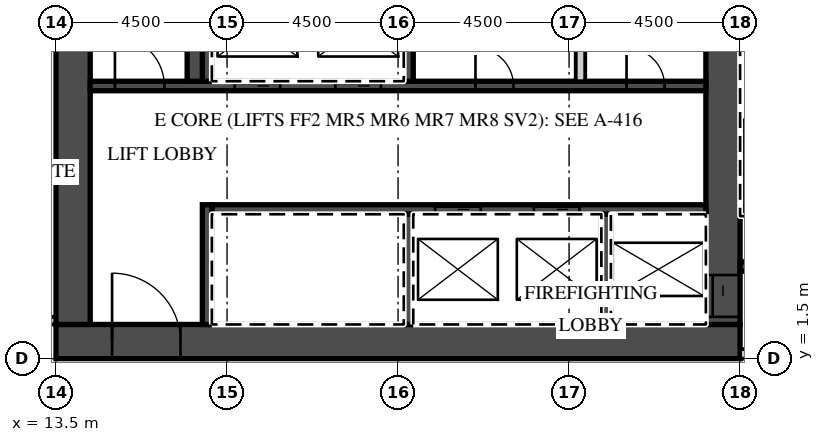
"""IFC4 building model, lengths in metres.
Left out: names, types, materials, properties, quantities, classifications, styles, units other than length and angle.
Written with IfcOpenShell. Run it as: python <this file> out.ifc"""

import sys

from ifc_helpers import new_model, si_unit, direction, frame, frame_2d, origin, place, context, subcontext, project, spatial, rectangle, extrude, element, fill, save


model = new_model("IFC4")
c1 = context("Model", 3, precision=1e-05, world=origin(), true_north=direction((0.0, 1.0)))
c2 = subcontext(c1, "Body", "Model", "MODEL_VIEW")
j1 = project(units=[si_unit("LENGTHUNIT", "METRE"), si_unit("PLANEANGLEUNIT", "RADIAN")], contexts=[c1])
p1 = place(None, origin())
s1 = spatial("IfcSite", under=j1, at=p1, CompositionType="ELEMENT")
p2 = place(p1, origin())
s2 = spatial("IfcBuilding", under=s1, at=p2, CompositionType="ELEMENT")
p3 = place(p2, frame((0.0, 0.0, 203.2)))
s3 = spatial("IfcBuildingStorey", under=s2, at=p3, CompositionType="ELEMENT", Elevation=203.2)
p4 = place(p3, frame((-13.5, 2.5, 0.0), z_axis=(0.0, 0.0, 1.0), x_axis=(1.0, 0.0, 0.0)))
e1 = element("IfcWall", 1, at=p4, inside=s3, PredefinedType="PARTITIONING", context=c2, shape_type="SweptSolid", body=[
    extrude(rectangle(XDim=27.0, YDim=0.2, at=frame_2d((13.5, 0.0))), origin(), (0.0, 0.0, 1.0), 3.0),
])
p5 = place(p4, frame((2.925, 0.0, 0.0)))
e2 = element("IfcOpeningElement", 2, at=p5, cuts=e1, PredefinedType="OPENING", context=c2, shape_type="SweptSolid", body=[
    extrude(rectangle(XDim=1.0, YDim=2.1, at=frame_2d((0.5, 1.05))), frame((0.0, 0.11, 0.0), z_axis=(0.0, -1.0, 0.0), x_axis=(1.0, 0.0, 0.0)), (0.0, 0.0, 1.0), 0.22),
])
p6 = place(p4, frame((9.863, 0.0, 0.0)))
e3 = element("IfcOpeningElement", 3, at=p6, cuts=e1, PredefinedType="OPENING", context=c2, shape_type="SweptSolid", body=[
    extrude(rectangle(XDim=1.2, YDim=2.1, at=frame_2d((0.6, 1.05))), frame((0.0, 0.11, 0.0), z_axis=(0.0, -1.0, 0.0), x_axis=(1.0, 0.0, 0.0)), (0.0, 0.0, 1.0), 0.22),
])
p7 = place(p4, frame((15.938, 0.0, 0.0)))
e4 = element("IfcOpeningElement", 4, at=p7, cuts=e1, PredefinedType="OPENING", context=c2, shape_type="SweptSolid", body=[
    extrude(rectangle(XDim=1.2, YDim=2.1, at=frame_2d((0.6, 1.05))), frame((0.0, 0.11, 0.0), z_axis=(0.0, -1.0, 0.0), x_axis=(1.0, 0.0, 0.0)), (0.0, 0.0, 1.0), 0.22),
])
p8 = place(p4, frame((23.075, 0.0, 0.0)))
e5 = element("IfcOpeningElement", 5, at=p8, cuts=e1, PredefinedType="OPENING", context=c2, shape_type="SweptSolid", body=[
    extrude(rectangle(XDim=1.0, YDim=2.1, at=frame_2d((0.5, 1.05))), frame((0.0, 0.11, 0.0), z_axis=(0.0, -1.0, 0.0), x_axis=(1.0, 0.0, 0.0)), (0.0, 0.0, 1.0), 0.22),
])
p9 = place(p3, frame((13.5, 1.95, 0.0), z_axis=(0.0, 0.0, 1.0), x_axis=(1.0, 0.0, 0.0)))
e6 = element("IfcWall", 6, at=p9, inside=s3, PredefinedType="SHEAR", context=c2, shape_type="SweptSolid", body=[
    extrude(rectangle(XDim=18.0, YDim=0.9, at=frame_2d((9.0, 0.0))), origin(), (0.0, 0.0, 1.0), 3.0),
])
p10 = place(p9, frame((1.475, 0.0, 0.0)))
e7 = element("IfcOpeningElement", 7, at=p10, cuts=e6, PredefinedType="OPENING", context=c2, shape_type="SweptSolid", body=[
    extrude(rectangle(XDim=1.8, YDim=2.1, at=frame_2d((0.9, 1.05))), frame((0.0, 0.46, 0.0), z_axis=(0.0, -1.0, 0.0), x_axis=(1.0, 0.0, 0.0)), (0.0, 0.0, 1.0), 0.92),
])
p11 = place(p3, frame((31.05, 2.4, 0.0), z_axis=(0.0, 0.0, 1.0), x_axis=(0.0, 1.0, 0.0)))
e8 = element("IfcWall", 8, at=p11, inside=s3, PredefinedType="SHEAR", context=c2, shape_type="SweptSolid", body=[
    extrude(rectangle(XDim=12.8, YDim=0.9, at=frame_2d((6.4, 0.0))), origin(), (0.0, 0.0, 1.0), 3.0),
])
p12 = place(p11, frame((0.2, 0.0, 0.0)))
e9 = element("IfcOpeningElement", 9, at=p12, cuts=e8, PredefinedType="OPENING", context=c2, shape_type="SweptSolid", body=[
    extrude(rectangle(XDim=1.1, YDim=2.1, at=frame_2d((0.55, 1.05))), frame((0.0, 0.46, 0.0), z_axis=(0.0, -1.0, 0.0), x_axis=(1.0, 0.0, 0.0)), (0.0, 0.0, 1.0), 0.92),
])
p13 = place(p3, frame((13.95, 2.4, 0.0), z_axis=(0.0, 0.0, 1.0), x_axis=(0.0, 1.0, 0.0)))
e10 = element("IfcWall", 10, at=p13, inside=s3, PredefinedType="SHEAR", context=c2, shape_type="SweptSolid", body=[
    extrude(rectangle(XDim=12.2, YDim=0.9, at=frame_2d((6.1, 0.0))), origin(), (0.0, 0.0, 1.0), 3.0),
])
p14 = place(p3, frame((17.6, 5.425, 0.0), z_axis=(0.0, 0.0, 1.0), x_axis=(1.0, 0.0, 0.0)))
e11 = element("IfcWall", 11, at=p14, inside=s3, PredefinedType="SHEAR", context=c2, shape_type="SweptSolid", body=[
    extrude(rectangle(XDim=13.0, YDim=0.25, at=frame_2d((6.5, 0.0))), origin(), (0.0, 0.0, 1.0), 3.0),
])
p15 = place(p14, frame((8.475, 0.0, 0.0)))
e12 = element("IfcOpeningElement", 12, at=p15, cuts=e11, PredefinedType="OPENING", context=c2, shape_type="SweptSolid", body=[
    extrude(rectangle(XDim=1.2, YDim=2.1, at=frame_2d((0.6, 1.05))), frame((0.0, 0.135, 0.0), z_axis=(0.0, -1.0, 0.0), x_axis=(1.0, 0.0, 0.0)), (0.0, 0.0, 1.0), 0.27),
])
p16 = place(p14, frame((5.875, 0.0, 0.0)))
e13 = element("IfcOpeningElement", 13, at=p16, cuts=e11, PredefinedType="OPENING", context=c2, shape_type="SweptSolid", body=[
    extrude(rectangle(XDim=1.2, YDim=2.1, at=frame_2d((0.6, 1.05))), frame((0.0, 0.135, 0.0), z_axis=(0.0, -1.0, 0.0), x_axis=(1.0, 0.0, 0.0)), (0.0, 0.0, 1.0), 0.27),
])
p17 = place(p3, frame((17.475, 2.4, 0.0), z_axis=(0.0, 0.0, 1.0), x_axis=(0.0, 1.0, 0.0)))
e14 = element("IfcWall", 14, at=p17, inside=s3, PredefinedType="SHEAR", context=c2, shape_type="SweptSolid", body=[
    extrude(rectangle(XDim=3.15, YDim=0.25, at=frame_2d((1.575, 0.0))), origin(), (0.0, 0.0, 1.0), 3.0),
])
for number, where, z_axis, x_axis in (
    (15, (27.975, 2.4, 0.0), (0.0, 0.0, 1.0), (0.0, 1.0, 0.0)),
    (16, (22.775, 2.4, 0.0), (0.0, 0.0, 1.0), (0.0, 1.0, 0.0)),
):
    element("IfcWall", number, at=place(p3, frame(where, z_axis=z_axis, x_axis=x_axis)), inside=s3, PredefinedType="SHEAR", context=c2, shape_type="SweptSolid", body=[
        extrude(rectangle(XDim=2.9, YDim=0.25, at=frame_2d((1.45, 0.0))), origin(), (0.0, 0.0, 1.0), 3.0),
    ])
p18 = place(p3, frame((14.4, 8.675, 0.0), z_axis=(0.0, 0.0, 1.0), x_axis=(1.0, 0.0, 0.0)))
e17 = element("IfcWall", 17, at=p18, inside=s3, PredefinedType="SHEAR", context=c2, shape_type="SweptSolid", body=[
    extrude(rectangle(XDim=16.2, YDim=0.25, at=frame_2d((8.1, 0.0))), origin(), (0.0, 0.0, 1.0), 3.0),
])
p19 = place(p18, frame((6.45, 0.0, 0.0)))
e18 = element("IfcOpeningElement", 18, at=p19, cuts=e17, PredefinedType="OPENING", context=c2, shape_type="SweptSolid", body=[
    extrude(rectangle(XDim=1.2, YDim=2.1, at=frame_2d((0.6, 1.05))), frame((0.0, 0.135, 0.0), z_axis=(0.0, -1.0, 0.0), x_axis=(1.0, 0.0, 0.0)), (0.0, 0.0, 1.0), 0.27),
])
p20 = place(p18, frame((3.8, 0.0, 0.0)))
e19 = element("IfcOpeningElement", 19, at=p20, cuts=e17, PredefinedType="OPENING", context=c2, shape_type="SweptSolid", body=[
    extrude(rectangle(XDim=1.2, YDim=2.1, at=frame_2d((0.6, 1.05))), frame((0.0, 0.135, 0.0), z_axis=(0.0, -1.0, 0.0), x_axis=(1.0, 0.0, 0.0)), (0.0, 0.0, 1.0), 0.27),
])
p21 = place(p18, frame((0.65, 0.0, 0.0)))
e20 = element("IfcOpeningElement", 20, at=p21, cuts=e17, PredefinedType="OPENING", context=c2, shape_type="SweptSolid", body=[
    extrude(rectangle(XDim=1.3, YDim=2.1, at=frame_2d((0.65, 1.05))), frame((0.0, 0.135, 0.0), z_axis=(0.0, -1.0, 0.0), x_axis=(1.0, 0.0, 0.0)), (0.0, 0.0, 1.0), 0.27),
])
p22 = place(p18, frame((14.113, 0.0, 0.0)))
e21 = element("IfcOpeningElement", 21, at=p22, cuts=e17, PredefinedType="OPENING", context=c2, shape_type="SweptSolid", body=[
    extrude(rectangle(XDim=1.0, YDim=2.1, at=frame_2d((0.5, 1.05))), frame((0.0, 0.135, 0.0), z_axis=(0.0, -1.0, 0.0), x_axis=(1.0, 0.0, 0.0)), (0.0, 0.0, 1.0), 0.27),
])
p23 = place(p18, frame((10.137, 0.0, 0.0)))
e22 = element("IfcOpeningElement", 22, at=p23, cuts=e17, PredefinedType="OPENING", context=c2, shape_type="SweptSolid", body=[
    extrude(rectangle(XDim=1.0, YDim=2.1, at=frame_2d((0.5, 1.05))), frame((0.0, 0.135, 0.0), z_axis=(0.0, -1.0, 0.0), x_axis=(1.0, 0.0, 0.0)), (0.0, 0.0, 1.0), 0.27),
])
for number, where, z_axis, x_axis in (
    (23, (17.475, 8.8, 0.0), (0.0, 0.0, 1.0), (0.0, 1.0, 0.0)),
    (24, (22.775, 8.8, 0.0), (0.0, 0.0, 1.0), (0.0, 1.0, 0.0)),
):
    element("IfcWall", number, at=place(p3, frame(where, z_axis=z_axis, x_axis=x_axis)), inside=s3, PredefinedType="SHEAR", context=c2, shape_type="SweptSolid", body=[
        extrude(rectangle(XDim=2.9, YDim=0.25, at=frame_2d((1.45, 0.0))), origin(), (0.0, 0.0, 1.0), 3.0),
    ])
p24 = place(p3, frame((27.3, 8.8, 0.0), z_axis=(0.0, 0.0, 1.0), x_axis=(0.0, 1.0, 0.0)))
e25 = element("IfcWall", 25, at=p24, inside=s3, PredefinedType="PARTITIONING", context=c2, shape_type="SweptSolid", body=[
    extrude(rectangle(XDim=2.9, YDim=0.25, at=frame_2d((1.45, 0.0))), origin(), (0.0, 0.0, 1.0), 3.0),
])
p25 = place(p3, frame((17.15, 8.8, 0.0), z_axis=(0.0, 0.0, 1.0), x_axis=(0.0, 1.0, 0.0)))
e26 = element("IfcWall", 26, at=p25, inside=s3, PredefinedType="SHEAR", context=c2, shape_type="SweptSolid", body=[
    extrude(rectangle(XDim=5.8, YDim=0.4, at=frame_2d((2.9, 0.0))), origin(), (0.0, 0.0, 1.0), 3.0),
])
p26 = place(p3, frame((31.5, 1.625, 0.0), z_axis=(0.0, 0.0, 1.0), x_axis=(1.0, 0.0, 0.0)))
e27 = element("IfcWall", 27, at=p26, inside=s3, PredefinedType="PARTITIONING", context=c2, shape_type="SweptSolid", body=[
    extrude(rectangle(XDim=8.035, YDim=0.25, at=frame_2d((4.018, 0.0))), origin(), (0.0, 0.0, 1.0), 3.0),
])
p27 = place(p26, frame((0.625, 0.0, 0.0)))
e28 = element("IfcOpeningElement", 28, at=p27, cuts=e27, PredefinedType="OPENING", context=c2, shape_type="SweptSolid", body=[
    extrude(rectangle(XDim=1.3, YDim=2.1, at=frame_2d((0.65, 1.05))), frame((0.0, 0.135, 0.0), z_axis=(0.0, -1.0, 0.0), x_axis=(1.0, 0.0, 0.0)), (0.0, 0.0, 1.0), 0.27),
])
p28 = place(p26, frame((3.25, 0.0, 0.0)))
e29 = element("IfcOpeningElement", 29, at=p28, cuts=e27, PredefinedType="OPENING", context=c2, shape_type="SweptSolid", body=[
    extrude(rectangle(XDim=1.1, YDim=2.1, at=frame_2d((0.55, 1.05))), frame((0.0, 0.135, 0.0), z_axis=(0.0, -1.0, 0.0), x_axis=(1.0, 0.0, 0.0)), (0.0, 0.0, 1.0), 0.27),
])
p29 = place(p3, frame((31.5, 3.925, 0.0), z_axis=(0.0, 0.0, 1.0), x_axis=(1.0, 0.0, 0.0)))
e30 = element("IfcWall", 30, at=p29, inside=s3, PredefinedType="SHEAR", context=c2, shape_type="SweptSolid", body=[
    extrude(rectangle(XDim=2.55, YDim=0.25, at=frame_2d((1.275, 0.0))), origin(), (0.0, 0.0, 1.0), 3.0),
])
p30 = place(p29, frame((0.625, 0.0, 0.0)))
e31 = element("IfcOpeningElement", 31, at=p30, cuts=e30, PredefinedType="OPENING", context=c2, shape_type="SweptSolid", body=[
    extrude(rectangle(XDim=1.3, YDim=2.1, at=frame_2d((0.65, 1.05))), frame((0.0, 0.135, 0.0), z_axis=(0.0, -1.0, 0.0), x_axis=(1.0, 0.0, 0.0)), (0.0, 0.0, 1.0), 0.27),
])
p31 = place(p19, origin())
e32 = element("IfcDoor", 32, at=p31, inside=s3, OperationType="SLIDING_TO_LEFT", PredefinedType="DOOR", context=c2, shape_type="SweptSolid", body=[
    extrude(rectangle(XDim=1.2, YDim=2.1, at=frame_2d((0.6, 1.05))), frame((0.0, 0.025, 0.0), z_axis=(0.0, -1.0, 0.0), x_axis=(1.0, 0.0, 0.0)), (0.0, 0.0, 1.0), 0.05),
])
fill(e18, e32)
p32 = place(p20, origin())
e33 = element("IfcDoor", 33, at=p32, inside=s3, OperationType="SLIDING_TO_RIGHT", PredefinedType="DOOR", context=c2, shape_type="SweptSolid", body=[
    extrude(rectangle(XDim=1.2, YDim=2.1, at=frame_2d((0.6, 1.05))), frame((0.0, 0.025, 0.0), z_axis=(0.0, -1.0, 0.0), x_axis=(1.0, 0.0, 0.0)), (0.0, 0.0, 1.0), 0.05),
])
fill(e19, e33)
p33 = place(p15, origin())
e34 = element("IfcDoor", 34, at=p33, inside=s3, OperationType="SLIDING_TO_LEFT", PredefinedType="DOOR", context=c2, shape_type="SweptSolid", body=[
    extrude(rectangle(XDim=1.2, YDim=2.1, at=frame_2d((0.6, 1.05))), frame((0.0, 0.025, 0.0), z_axis=(0.0, -1.0, 0.0), x_axis=(1.0, 0.0, 0.0)), (0.0, 0.0, 1.0), 0.05),
])
fill(e12, e34)
p34 = place(p16, origin())
e35 = element("IfcDoor", 35, at=p34, inside=s3, OperationType="SLIDING_TO_RIGHT", PredefinedType="DOOR", context=c2, shape_type="SweptSolid", body=[
    extrude(rectangle(XDim=1.2, YDim=2.1, at=frame_2d((0.6, 1.05))), frame((0.0, 0.025, 0.0), z_axis=(0.0, -1.0, 0.0), x_axis=(1.0, 0.0, 0.0)), (0.0, 0.0, 1.0), 0.05),
])
fill(e13, e35)
p35 = place(p12, origin())
e36 = element("IfcDoor", 36, at=p35, inside=s3, OperationType="SLIDING_TO_LEFT", PredefinedType="DOOR", context=c2, shape_type="SweptSolid", body=[
    extrude(rectangle(XDim=1.1, YDim=2.1, at=frame_2d((0.55, 1.05))), frame((0.0, 0.025, 0.0), z_axis=(0.0, -1.0, 0.0), x_axis=(1.0, 0.0, 0.0)), (0.0, 0.0, 1.0), 0.05),
])
fill(e9, e36)
p36 = place(p10, origin())
e37 = element("IfcDoor", 37, at=p36, inside=s3, OperationType="DOUBLE_DOOR_DOUBLE_SWING", PredefinedType="DOOR", context=c2, shape_type="SweptSolid", body=[
    extrude(rectangle(XDim=1.8, YDim=2.1, at=frame_2d((0.9, 1.05))), frame((0.0, 0.025, 0.0), z_axis=(0.0, -1.0, 0.0), x_axis=(1.0, 0.0, 0.0)), (0.0, 0.0, 1.0), 0.05),
])
fill(e7, e37)
p37 = place(p21, origin())
e38 = element("IfcDoor", 38, at=p37, inside=s3, OperationType="SINGLE_SWING_LEFT", PredefinedType="DOOR", context=c2, shape_type="SweptSolid", body=[
    extrude(rectangle(XDim=1.3, YDim=2.1, at=frame_2d((0.65, 1.05))), frame((0.0, 0.025, 0.0), z_axis=(0.0, -1.0, 0.0), x_axis=(1.0, 0.0, 0.0)), (0.0, 0.0, 1.0), 0.05),
])
fill(e20, e38)
p38 = place(p22, origin())
e39 = element("IfcDoor", 39, at=p38, inside=s3, OperationType="SINGLE_SWING_LEFT", PredefinedType="DOOR", context=c2, shape_type="SweptSolid", body=[
    extrude(rectangle(XDim=1.0, YDim=2.1, at=frame_2d((0.5, 1.05))), frame((0.0, 0.025, 0.0), z_axis=(0.0, -1.0, 0.0), x_axis=(1.0, 0.0, 0.0)), (0.0, 0.0, 1.0), 0.05),
])
fill(e21, e39)
p39 = place(p23, origin())
e40 = element("IfcDoor", 40, at=p39, inside=s3, OperationType="SINGLE_SWING_LEFT", PredefinedType="DOOR", context=c2, shape_type="SweptSolid", body=[
    extrude(rectangle(XDim=1.0, YDim=2.1, at=frame_2d((0.5, 1.05))), frame((0.0, 0.025, 0.0), z_axis=(0.0, -1.0, 0.0), x_axis=(1.0, 0.0, 0.0)), (0.0, 0.0, 1.0), 0.05),
])
fill(e22, e40)
save(model, sys.argv[1])
